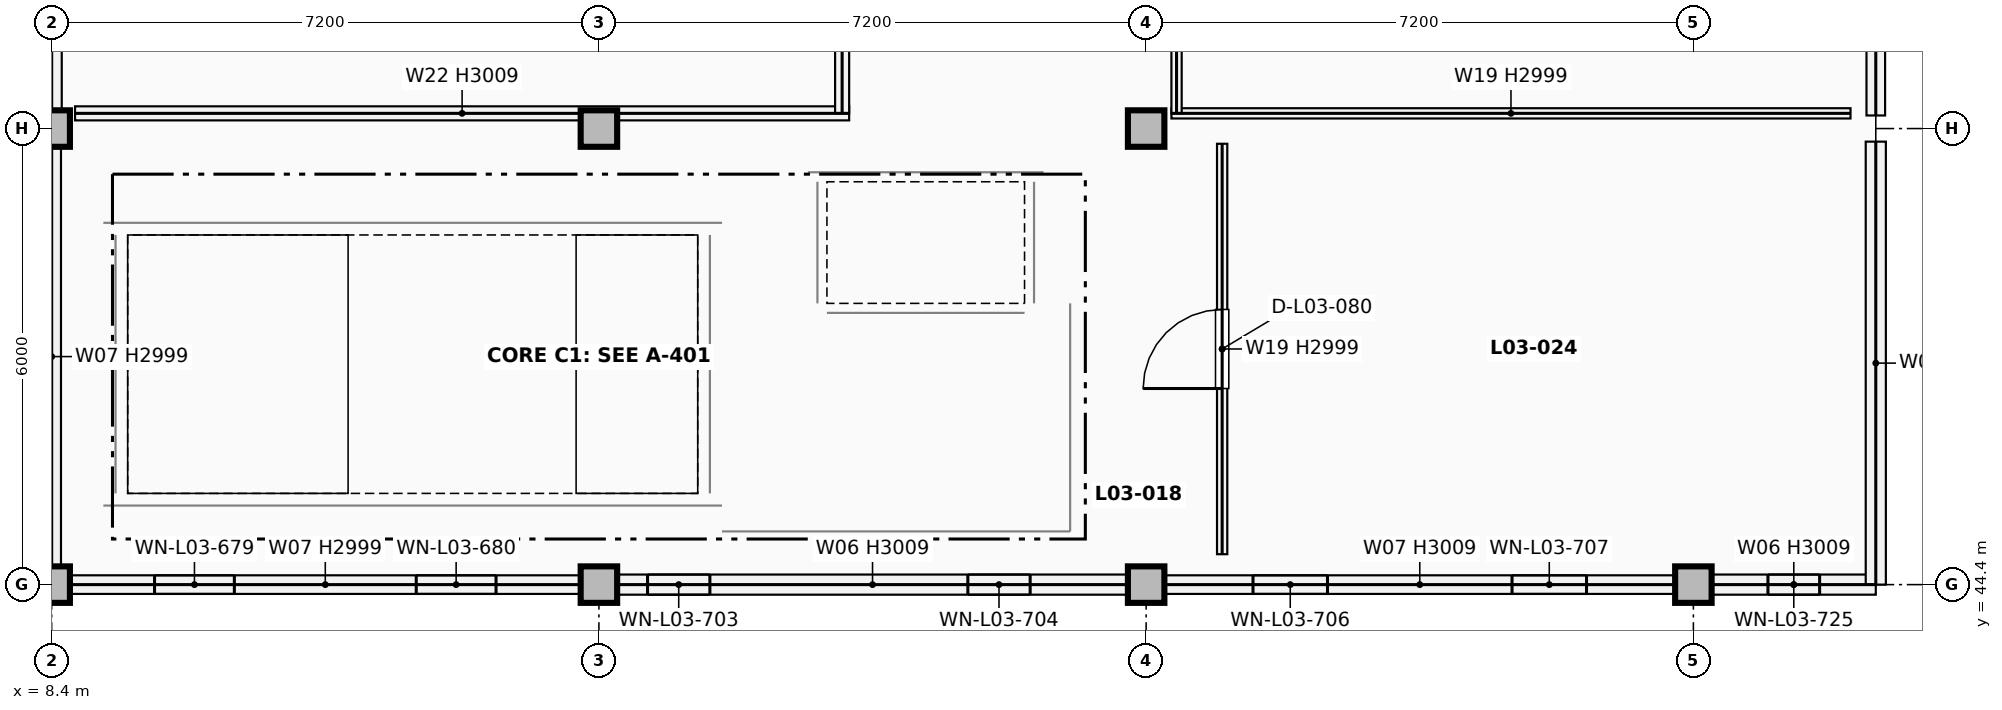
"""IFC4 building model, lengths in metres.
Left out: names, types, materials, properties, quantities, classifications, styles, units other than length and angle.
Written with IfcOpenShell. Run it as: python <this file> out.ifc"""

import sys

from ifc_helpers import new_model, si_unit, direction, frame, frame_2d, origin, origin_2d, place, context, subcontext, project, spatial, rectangle, extrude, element, fill, save


model = new_model("IFC4")
c1 = context("Model", 3, precision=1e-05, world=origin(), true_north=direction((0.0, 1.0)))
c2 = subcontext(c1, "Body", "Model", "MODEL_VIEW")
j1 = project(units=[si_unit("LENGTHUNIT", "METRE"), si_unit("PLANEANGLEUNIT", "RADIAN")], contexts=[c1])
p1 = place(None, origin())
s1 = spatial("IfcSite", under=j1, at=p1, CompositionType="ELEMENT")
p2 = place(p1, origin())
s2 = spatial("IfcBuilding", under=s1, at=p2, CompositionType="ELEMENT")
p3 = place(p2, frame((0.0, 0.0, 13.6)))
s3 = spatial("IfcBuildingStorey", under=s2, at=p3, CompositionType="ELEMENT", Elevation=13.6)
for number, where, z_axis, x_axis in (
    (1, (8.4, 44.4, 0.0), (0.0, 0.0, 1.0), (1.0, 0.0, 0.0)),
    (2, (8.4, 50.4, 0.0), (0.0, 0.0, 1.0), (1.0, 0.0, 0.0)),
    (3, (15.6, 44.4, 0.0), (0.0, 0.0, 1.0), (1.0, 0.0, 0.0)),
    (4, (15.6, 50.4, 0.0), (0.0, 0.0, 1.0), (1.0, 0.0, 0.0)),
    (5, (22.8, 44.4, 0.0), (0.0, 0.0, 1.0), (1.0, 0.0, 0.0)),
    (6, (22.8, 50.4, 0.0), (0.0, 0.0, 1.0), (1.0, 0.0, 0.0)),
    (7, (30.0, 44.4, 0.0), (0.0, 0.0, 1.0), (1.0, 0.0, 0.0)),
):
    element("IfcColumn", number, at=place(p3, frame(where, z_axis=z_axis, x_axis=x_axis)), inside=s3, PredefinedType="COLUMN", context=c2, shape_type="SweptSolid", body=[
        extrude(rectangle(XDim=0.48, YDim=0.48, at=origin_2d()), origin(), (0.0, 0.0, 1.0), 3.74),
    ])
p4 = place(p3, frame((8.642, 44.4, 0.0), z_axis=(0.0, 0.0, 1.0), x_axis=(1.0, 0.0, 0.0)))
e8 = element("IfcWall", 8, at=p4, inside=s3, PredefinedType="SOLIDWALL", context=c2, shape_type="SweptSolid", body=[
    extrude(rectangle(XDim=6.716, YDim=0.245, at=frame_2d((3.358, 0.0))), origin(), (0.0, 0.0, 1.0), 2.999),
])
p5 = place(p4, frame((1.112, 0.0, 0.75)))
e9 = element("IfcOpeningElement", 9, at=p5, cuts=e8, PredefinedType="OPENING", context=c2, shape_type="SweptSolid", body=[
    extrude(rectangle(XDim=1.05, YDim=1.7, at=frame_2d((0.525, 0.85))), frame((0.0, 0.133, 0.0), z_axis=(0.0, -1.0, 0.0), x_axis=(1.0, 0.0, 0.0)), (0.0, 0.0, 1.0), 0.265),
])
p6 = place(p4, frame((4.554, 0.0, 0.75)))
e10 = element("IfcOpeningElement", 10, at=p6, cuts=e8, PredefinedType="OPENING", context=c2, shape_type="SweptSolid", body=[
    extrude(rectangle(XDim=1.05, YDim=1.7, at=frame_2d((0.525, 0.85))), frame((0.0, 0.133, 0.0), z_axis=(0.0, -1.0, 0.0), x_axis=(1.0, 0.0, 0.0)), (0.0, 0.0, 1.0), 0.265),
])
p7 = place(p3, frame((15.842, 44.4, 0.0), z_axis=(0.0, 0.0, 1.0), x_axis=(1.0, 0.0, 0.0)))
e11 = element("IfcWall", 11, at=p7, inside=s3, PredefinedType="SOLIDWALL", context=c2, shape_type="SweptSolid", body=[
    extrude(rectangle(XDim=6.716, YDim=0.265, at=frame_2d((3.358, 0.0))), origin(), (0.0, 0.0, 1.0), 3.009),
])
p8 = place(p7, frame((0.398, 0.0, 0.75)))
e12 = element("IfcOpeningElement", 12, at=p8, cuts=e11, PredefinedType="OPENING", context=c2, shape_type="SweptSolid", body=[
    extrude(rectangle(XDim=0.82, YDim=2.02, at=frame_2d((0.41, 1.01))), frame((0.0, 0.143, 0.0), z_axis=(0.0, -1.0, 0.0), x_axis=(1.0, 0.0, 0.0)), (0.0, 0.0, 1.0), 0.285),
])
p9 = place(p7, frame((4.612, 0.0, 0.75)))
e13 = element("IfcOpeningElement", 13, at=p9, cuts=e11, PredefinedType="OPENING", context=c2, shape_type="SweptSolid", body=[
    extrude(rectangle(XDim=0.82, YDim=2.02, at=frame_2d((0.41, 1.01))), frame((0.0, 0.143, 0.0), z_axis=(0.0, -1.0, 0.0), x_axis=(1.0, 0.0, 0.0)), (0.0, 0.0, 1.0), 0.285),
])
p10 = place(p3, frame((23.042, 44.4, 0.0), z_axis=(0.0, 0.0, 1.0), x_axis=(1.0, 0.0, 0.0)))
e14 = element("IfcWall", 14, at=p10, inside=s3, PredefinedType="SOLIDWALL", context=c2, shape_type="SweptSolid", body=[
    extrude(rectangle(XDim=6.716, YDim=0.245, at=frame_2d((3.358, 0.0))), origin(), (0.0, 0.0, 1.0), 3.009),
])
p11 = place(p10, frame((1.164, 0.0, 0.75)))
e15 = element("IfcOpeningElement", 15, at=p11, cuts=e14, PredefinedType="OPENING", context=c2, shape_type="SweptSolid", body=[
    extrude(rectangle(XDim=0.98, YDim=2.08, at=frame_2d((0.49, 1.04))), frame((0.0, 0.133, 0.0), z_axis=(0.0, -1.0, 0.0), x_axis=(1.0, 0.0, 0.0)), (0.0, 0.0, 1.0), 0.265),
])
p12 = place(p10, frame((4.572, 0.0, 0.75)))
e16 = element("IfcOpeningElement", 16, at=p12, cuts=e14, PredefinedType="OPENING", context=c2, shape_type="SweptSolid", body=[
    extrude(rectangle(XDim=0.98, YDim=2.08, at=frame_2d((0.49, 1.04))), frame((0.0, 0.133, 0.0), z_axis=(0.0, -1.0, 0.0), x_axis=(1.0, 0.0, 0.0)), (0.0, 0.0, 1.0), 0.265),
])
p13 = place(p3, frame((30.242, 44.4, 0.0), z_axis=(0.0, 0.0, 1.0), x_axis=(1.0, 0.0, 0.0)))
e17 = element("IfcWall", 17, at=p13, inside=s3, PredefinedType="SOLIDWALL", context=c2, shape_type="SweptSolid", body=[
    extrude(rectangle(XDim=2.158, YDim=0.265, at=frame_2d((1.079, 0.0))), origin(), (0.0, 0.0, 1.0), 3.009),
])
p14 = place(p13, frame((0.739, 0.0, 0.75)))
e18 = element("IfcOpeningElement", 18, at=p14, cuts=e17, PredefinedType="OPENING", context=c2, shape_type="SweptSolid", body=[
    extrude(rectangle(XDim=0.68, YDim=1.96, at=frame_2d((0.34, 0.98))), frame((0.0, 0.143, 0.0), z_axis=(0.0, -1.0, 0.0), x_axis=(1.0, 0.0, 0.0)), (0.0, 0.0, 1.0), 0.285),
])
p15 = place(p3, frame((8.4, 44.642, 0.0), z_axis=(0.0, 0.0, 1.0), x_axis=(0.0, 1.0, 0.0)))
e19 = element("IfcWall", 19, at=p15, inside=s3, PredefinedType="SOLIDWALL", context=c2, shape_type="SweptSolid", body=[
    extrude(rectangle(XDim=5.516, YDim=0.245, at=frame_2d((2.758, 0.0))), origin(), (0.0, 0.0, 1.0), 2.999),
])
p16 = place(p3, frame((8.4, 50.642, 0.0), z_axis=(0.0, 0.0, 1.0), x_axis=(0.0, 1.0, 0.0)))
e20 = element("IfcWall", 20, at=p16, inside=s3, PredefinedType="SOLIDWALL", context=c2, shape_type="SweptSolid", body=[
    extrude(rectangle(XDim=6.786, YDim=0.265, at=frame_2d((3.393, 0.0))), origin(), (0.0, 0.0, 1.0), 2.999),
])
p17 = place(p3, frame((32.4, 44.4, 0.0), z_axis=(0.0, 0.0, 1.0), x_axis=(0.0, 1.0, 0.0)))
e21 = element("IfcWall", 21, at=p17, inside=s3, PredefinedType="SOLIDWALL", context=c2, shape_type="SweptSolid", body=[
    extrude(rectangle(XDim=5.828, YDim=0.265, at=frame_2d((2.914, 0.0))), origin(), (0.0, 0.0, 1.0), 2.999),
])
p18 = place(p3, frame((32.4, 50.572, 0.0), z_axis=(0.0, 0.0, 1.0), x_axis=(0.0, 1.0, 0.0)))
e22 = element("IfcWall", 22, at=p18, inside=s3, PredefinedType="SOLIDWALL", context=c2, shape_type="SweptSolid", body=[
    extrude(rectangle(XDim=6.856, YDim=0.245, at=frame_2d((3.428, 0.0))), origin(), (0.0, 0.0, 1.0), 2.999),
])
p19 = place(p3, frame((9.24, 45.6, 0.0), z_axis=(0.0, 0.0, 1.0), x_axis=(0.0, 1.0, 0.0)))
e23 = element("IfcWall", 23, at=p19, inside=s3, PredefinedType="SHEAR", context=c2, shape_type="SweptSolid", body=[
    extrude(rectangle(XDim=3.4, YDim=0.32, at=frame_2d((1.7, 0.0))), origin(), (0.0, 0.0, 1.0), 3.74),
])
for number, where, z_axis, x_axis in (
    (24, (9.08, 45.44, 0.0), (0.0, 0.0, 1.0), (1.0, 0.0, 0.0)),
    (25, (9.08, 49.16, 0.0), (0.0, 0.0, 1.0), (1.0, 0.0, 0.0)),
):
    element("IfcWall", number, at=place(p3, frame(where, z_axis=z_axis, x_axis=x_axis)), inside=s3, PredefinedType="SHEAR", context=c2, shape_type="SweptSolid", body=[
        extrude(rectangle(XDim=8.14, YDim=0.32, at=frame_2d((4.07, 0.0))), origin(), (0.0, 0.0, 1.0), 3.74),
    ])
p20 = place(p3, frame((17.06, 45.6, 0.0), z_axis=(0.0, 0.0, 1.0), x_axis=(0.0, 1.0, 0.0)))
e26 = element("IfcWall", 26, at=p20, inside=s3, PredefinedType="SHEAR", context=c2, shape_type="SweptSolid", body=[
    extrude(rectangle(XDim=3.4, YDim=0.32, at=frame_2d((1.7, 0.0))), origin(), (0.0, 0.0, 1.0), 3.74),
])
p21 = place(p20, frame((0.65, 0.0, 0.0)))
e27 = element("IfcOpeningElement", 27, at=p21, cuts=e26, PredefinedType="OPENING", context=c2, shape_type="SweptSolid", body=[
    extrude(rectangle(XDim=1.2, YDim=2.2, at=frame_2d((0.6, 1.1))), frame((0.0, 0.17, 0.0), z_axis=(0.0, -1.0, 0.0), x_axis=(1.0, 0.0, 0.0)), (0.0, 0.0, 1.0), 0.34),
])
for number, where, z_axis, x_axis in (
    (28, (18.475, 48.1, 0.0), (0.0, 0.0, 1.0), (0.0, 1.0, 0.0)),
    (29, (21.325, 48.1, 0.0), (0.0, 0.0, 1.0), (0.0, 1.0, 0.0)),
):
    element("IfcWall", number, at=place(p3, frame(where, z_axis=z_axis, x_axis=x_axis)), inside=s3, PredefinedType="SHEAR", context=c2, shape_type="SweptSolid", body=[
        extrude(rectangle(XDim=1.6, YDim=0.25, at=frame_2d((0.8, 0.0))), origin(), (0.0, 0.0, 1.0), 3.74),
    ])
p22 = place(p3, frame((18.35, 49.825, 0.0), z_axis=(0.0, 0.0, 1.0), x_axis=(1.0, 0.0, 0.0)))
e30 = element("IfcWall", 30, at=p22, inside=s3, PredefinedType="SHEAR", context=c2, shape_type="SweptSolid", body=[
    extrude(rectangle(XDim=3.1, YDim=0.25, at=frame_2d((1.55, 0.0))), origin(), (0.0, 0.0, 1.0), 3.74),
])
p23 = place(p3, frame((18.6, 47.975, 0.0), z_axis=(0.0, 0.0, 1.0), x_axis=(1.0, 0.0, 0.0)))
e31 = element("IfcWall", 31, at=p23, inside=s3, PredefinedType="SHEAR", context=c2, shape_type="SweptSolid", body=[
    extrude(rectangle(XDim=2.6, YDim=0.25, at=frame_2d((1.3, 0.0))), origin(), (0.0, 0.0, 1.0), 3.74),
])
p24 = place(p23, frame((0.75, 0.0, 0.0)))
e32 = element("IfcOpeningElement", 32, at=p24, cuts=e31, PredefinedType="OPENING", context=c2, shape_type="SweptSolid", body=[
    extrude(rectangle(XDim=1.1, YDim=2.15, at=frame_2d((0.55, 1.075))), frame((0.0, 0.135, 0.0), z_axis=(0.0, -1.0, 0.0), x_axis=(1.0, 0.0, 0.0)), (0.0, 0.0, 1.0), 0.27),
])
p25 = place(p3, frame((21.8, 45.1, 0.0), z_axis=(0.0, 0.0, 1.0), x_axis=(0.0, 1.0, 0.0)))
e33 = element("IfcWall", 33, at=p25, inside=s3, PredefinedType="PARTITIONING", context=c2, shape_type="SweptSolid", body=[
    extrude(rectangle(XDim=3.0, YDim=0.2, at=frame_2d((1.5, 0.0))), origin(), (0.0, 0.0, 1.0), 3.414),
])
p26 = place(p25, frame((0.775, 0.0, 0.0)))
e34 = element("IfcOpeningElement", 34, at=p26, cuts=e33, PredefinedType="OPENING", context=c2, shape_type="SweptSolid", body=[
    extrude(rectangle(XDim=1.45, YDim=2.2, at=frame_2d((0.725, 1.1))), frame((0.0, 0.11, 0.0), z_axis=(0.0, -1.0, 0.0), x_axis=(1.0, 0.0, 0.0)), (0.0, 0.0, 1.0), 0.22),
])
p27 = place(p3, frame((17.22, 45.1, 0.0), z_axis=(0.0, 0.0, 1.0), x_axis=(1.0, 0.0, 0.0)))
e35 = element("IfcWall", 35, at=p27, inside=s3, PredefinedType="PARTITIONING", context=c2, shape_type="SweptSolid", body=[
    extrude(rectangle(XDim=4.58, YDim=0.2, at=frame_2d((2.29, 0.0))), origin(), (0.0, 0.0, 1.0), 3.414),
])
p28 = place(p3, frame((8.708, 50.6, 0.0), z_axis=(0.0, 0.0, 1.0), x_axis=(1.0, 0.0, 0.0)))
e36 = element("IfcWall", 36, at=p28, inside=s3, PredefinedType="PARTITIONING", context=c2, shape_type="SweptSolid", body=[
    extrude(rectangle(XDim=10.185, YDim=0.185, at=frame_2d((5.093, 0.0))), origin(), (0.0, 0.0, 1.0), 3.009),
])
p29 = place(p3, frame((18.8, 50.6, 0.0), z_axis=(0.0, 0.0, 1.0), x_axis=(0.0, 1.0, 0.0)))
e37 = element("IfcWall", 37, at=p29, inside=s3, PredefinedType="PARTITIONING", context=c2, shape_type="SweptSolid", body=[
    extrude(rectangle(XDim=12.0, YDim=0.185, at=frame_2d((6.0, 0.0))), origin(), (0.0, 0.0, 1.0), 3.009),
])
p30 = place(p29, frame((2.837, 0.0, 0.0)))
e38 = element("IfcOpeningElement", 38, at=p30, cuts=e37, PredefinedType="OPENING", context=c2, shape_type="SweptSolid", body=[
    extrude(rectangle(XDim=1.05, YDim=2.15, at=frame_2d((0.525, 1.075))), frame((0.0, 0.103, 0.0), z_axis=(0.0, -1.0, 0.0), x_axis=(1.0, 0.0, 0.0)), (0.0, 0.0, 1.0), 0.205),
])
p31 = place(p3, frame((23.133, 50.6, 0.0), z_axis=(0.0, 0.0, 1.0), x_axis=(1.0, 0.0, 0.0)))
e39 = element("IfcWall", 39, at=p31, inside=s3, PredefinedType="PARTITIONING", context=c2, shape_type="SweptSolid", body=[
    extrude(rectangle(XDim=8.935, YDim=0.135, at=frame_2d((4.467, 0.0))), origin(), (0.0, 0.0, 1.0), 2.999),
])
p32 = place(p3, frame((23.2, 50.6, 0.0), z_axis=(0.0, 0.0, 1.0), x_axis=(0.0, 1.0, 0.0)))
e40 = element("IfcWall", 40, at=p32, inside=s3, PredefinedType="PARTITIONING", context=c2, shape_type="SweptSolid", body=[
    extrude(rectangle(XDim=12.0, YDim=0.135, at=frame_2d((6.0, 0.0))), origin(), (0.0, 0.0, 1.0), 2.999),
])
p33 = place(p32, frame((2.77, 0.0, 0.0)))
e41 = element("IfcOpeningElement", 41, at=p33, cuts=e40, PredefinedType="OPENING", context=c2, shape_type="SweptSolid", body=[
    extrude(rectangle(XDim=1.32, YDim=2.22, at=frame_2d((0.66, 1.11))), frame((0.0, 0.078, 0.0), z_axis=(0.0, -1.0, 0.0), x_axis=(1.0, 0.0, 0.0)), (0.0, 0.0, 1.0), 0.155),
])
p34 = place(p3, frame((23.8, 44.8, 0.0), z_axis=(0.0, 0.0, 1.0), x_axis=(0.0, 1.0, 0.0)))
e42 = element("IfcWall", 42, at=p34, inside=s3, PredefinedType="PARTITIONING", context=c2, shape_type="SweptSolid", body=[
    extrude(rectangle(XDim=5.4, YDim=0.135, at=frame_2d((2.7, 0.0))), origin(), (0.0, 0.0, 1.0), 2.999),
])
p35 = place(p34, frame((2.18, 0.0, 0.0)))
e43 = element("IfcOpeningElement", 43, at=p35, cuts=e42, PredefinedType="OPENING", context=c2, shape_type="SweptSolid", body=[
    extrude(rectangle(XDim=1.04, YDim=2.12, at=frame_2d((0.52, 1.06))), frame((0.0, 0.078, 0.0), z_axis=(0.0, -1.0, 0.0), x_axis=(1.0, 0.0, 0.0)), (0.0, 0.0, 1.0), 0.155),
])
p36 = place(p5, origin())
e44 = element("IfcWindow", 44, at=p36, inside=s3, PartitioningType="SINGLE_PANEL", PredefinedType="WINDOW", context=c2, shape_type="SweptSolid", body=[
    extrude(rectangle(XDim=1.05, YDim=1.7, at=frame_2d((0.525, 0.85))), frame((0.0, 0.03, 0.0), z_axis=(0.0, -1.0, 0.0), x_axis=(1.0, 0.0, 0.0)), (0.0, 0.0, 1.0), 0.06),
])
fill(e9, e44)
p37 = place(p6, origin())
e45 = element("IfcWindow", 45, at=p37, inside=s3, PartitioningType="SINGLE_PANEL", PredefinedType="WINDOW", context=c2, shape_type="SweptSolid", body=[
    extrude(rectangle(XDim=1.05, YDim=1.7, at=frame_2d((0.525, 0.85))), frame((0.0, 0.03, 0.0), z_axis=(0.0, -1.0, 0.0), x_axis=(1.0, 0.0, 0.0)), (0.0, 0.0, 1.0), 0.06),
])
fill(e10, e45)
p38 = place(p8, origin())
e46 = element("IfcWindow", 46, at=p38, inside=s3, PartitioningType="SINGLE_PANEL", PredefinedType="WINDOW", context=c2, shape_type="SweptSolid", body=[
    extrude(rectangle(XDim=0.82, YDim=2.02, at=frame_2d((0.41, 1.01))), frame((0.0, 0.03, 0.0), z_axis=(0.0, -1.0, 0.0), x_axis=(1.0, 0.0, 0.0)), (0.0, 0.0, 1.0), 0.06),
])
fill(e12, e46)
p39 = place(p9, origin())
e47 = element("IfcWindow", 47, at=p39, inside=s3, PartitioningType="SINGLE_PANEL", PredefinedType="WINDOW", context=c2, shape_type="SweptSolid", body=[
    extrude(rectangle(XDim=0.82, YDim=2.02, at=frame_2d((0.41, 1.01))), frame((0.0, 0.03, 0.0), z_axis=(0.0, -1.0, 0.0), x_axis=(1.0, 0.0, 0.0)), (0.0, 0.0, 1.0), 0.06),
])
fill(e13, e47)
p40 = place(p11, origin())
e48 = element("IfcWindow", 48, at=p40, inside=s3, PartitioningType="SINGLE_PANEL", PredefinedType="WINDOW", context=c2, shape_type="SweptSolid", body=[
    extrude(rectangle(XDim=0.98, YDim=2.08, at=frame_2d((0.49, 1.04))), frame((0.0, 0.03, 0.0), z_axis=(0.0, -1.0, 0.0), x_axis=(1.0, 0.0, 0.0)), (0.0, 0.0, 1.0), 0.06),
])
fill(e15, e48)
p41 = place(p12, origin())
e49 = element("IfcWindow", 49, at=p41, inside=s3, PartitioningType="SINGLE_PANEL", PredefinedType="WINDOW", context=c2, shape_type="SweptSolid", body=[
    extrude(rectangle(XDim=0.98, YDim=2.08, at=frame_2d((0.49, 1.04))), frame((0.0, 0.03, 0.0), z_axis=(0.0, -1.0, 0.0), x_axis=(1.0, 0.0, 0.0)), (0.0, 0.0, 1.0), 0.06),
])
fill(e16, e49)
p42 = place(p14, origin())
e50 = element("IfcWindow", 50, at=p42, inside=s3, PartitioningType="SINGLE_PANEL", PredefinedType="WINDOW", context=c2, shape_type="SweptSolid", body=[
    extrude(rectangle(XDim=0.68, YDim=1.96, at=frame_2d((0.34, 0.98))), frame((0.0, 0.03, 0.0), z_axis=(0.0, -1.0, 0.0), x_axis=(1.0, 0.0, 0.0)), (0.0, 0.0, 1.0), 0.06),
])
fill(e18, e50)
p43 = place(p21, origin())
e51 = element("IfcDoor", 51, at=p43, inside=s3, OperationType="SINGLE_SWING_LEFT", PredefinedType="DOOR", context=c2, shape_type="SweptSolid", body=[
    extrude(rectangle(XDim=1.2, YDim=2.2, at=frame_2d((0.6, 1.1))), frame((0.0, 0.025, 0.0), z_axis=(0.0, -1.0, 0.0), x_axis=(1.0, 0.0, 0.0)), (0.0, 0.0, 1.0), 0.05),
])
fill(e27, e51)
p44 = place(p24, origin())
e52 = element("IfcDoor", 52, at=p44, inside=s3, OperationType="DOUBLE_DOOR_SLIDING", PredefinedType="DOOR", context=c2, shape_type="SweptSolid", body=[
    extrude(rectangle(XDim=1.1, YDim=2.15, at=frame_2d((0.55, 1.075))), frame((0.0, 0.025, 0.0), z_axis=(0.0, -1.0, 0.0), x_axis=(1.0, 0.0, 0.0)), (0.0, 0.0, 1.0), 0.05),
])
fill(e32, e52)
p45 = place(p26, frame((1.45, 0.0, 0.0), z_axis=(0.0, 0.0, 1.0), x_axis=(-1.0, 0.0, 0.0)))
e53 = element("IfcDoor", 53, at=p45, inside=s3, OperationType="DOUBLE_DOOR_SINGLE_SWING", PredefinedType="DOOR", context=c2, shape_type="SweptSolid", body=[
    extrude(rectangle(XDim=1.45, YDim=2.2, at=frame_2d((0.725, 1.1))), frame((0.0, 0.025, 0.0), z_axis=(0.0, -1.0, 0.0), x_axis=(1.0, 0.0, 0.0)), (0.0, 0.0, 1.0), 0.05),
])
fill(e34, e53)
p46 = place(p35, origin())
e54 = element("IfcDoor", 54, at=p46, inside=s3, OperationType="SINGLE_SWING_LEFT", PredefinedType="DOOR", context=c2, shape_type="SweptSolid", body=[
    extrude(rectangle(XDim=1.04, YDim=2.12, at=frame_2d((0.52, 1.06))), frame((0.0, 0.025, 0.0), z_axis=(0.0, -1.0, 0.0), x_axis=(1.0, 0.0, 0.0)), (0.0, 0.0, 1.0), 0.05),
])
fill(e43, e54)
save(model, sys.argv[1])
